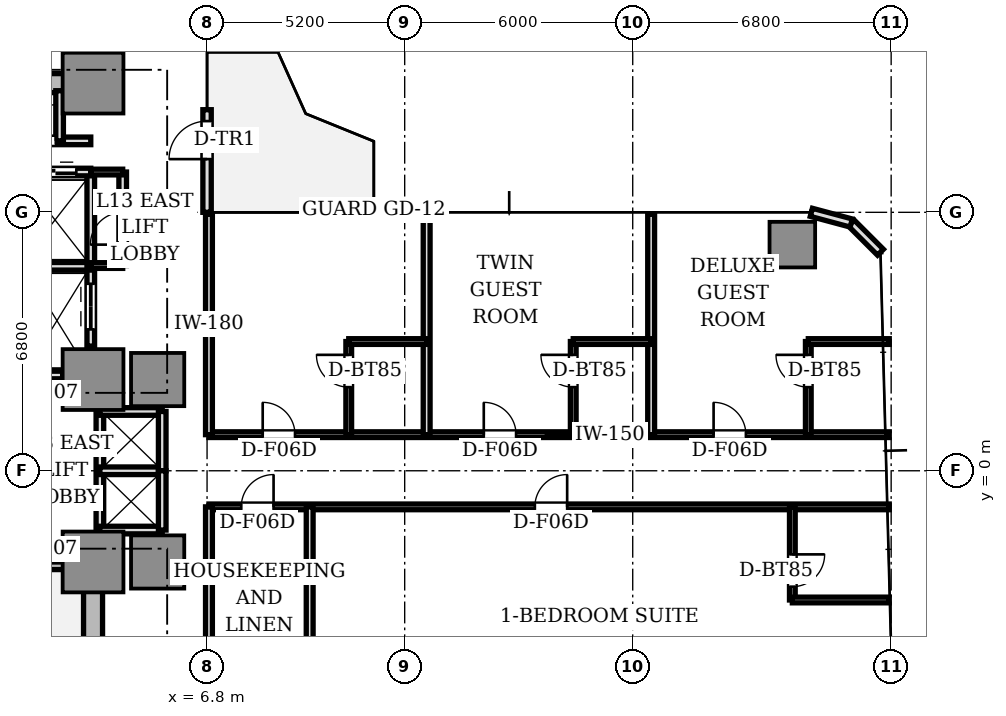
"""IFC4 building model, lengths in metres.
Left out: names, types, materials, properties, quantities, classifications, styles, units other than length and angle.
Written with IfcOpenShell. Run it as: python <this file> out.ifc"""

import sys

from ifc_helpers import new_model, si_unit, direction, frame, frame_2d, origin, origin_2d, place, context, subcontext, project, spatial, rectangle, extrude, source, transform, mapped, element, fill, save


model = new_model("IFC4")
c1 = context("Model", 3, precision=1e-05, world=origin(), true_north=direction((0.0, 1.0)))
c2 = subcontext(c1, "Body", "Model", "MODEL_VIEW")
j1 = project(units=[si_unit("LENGTHUNIT", "METRE"), si_unit("PLANEANGLEUNIT", "RADIAN")], contexts=[c1])
p1 = place(None, origin())
s1 = spatial("IfcSite", under=j1, at=p1, CompositionType="ELEMENT")
p2 = place(p1, origin())
s2 = spatial("IfcBuilding", under=s1, at=p2, CompositionType="ELEMENT")
p3 = place(p2, frame((0.0, 0.0, 51.05)))
s3 = spatial("IfcBuildingStorey", under=s2, at=p3, CompositionType="ELEMENT", Elevation=51.05)
p4 = place(p3, frame((-3.55, 10.2, 0.0), z_axis=(0.0, 0.0, 1.0), x_axis=(1.0, 0.0, 0.0)))
e1 = element("IfcWall", 1, at=p4, inside=s3, PredefinedType="SHEAR", context=c2, shape_type="SweptSolid", body=[
    extrude(rectangle(XDim=7.1, YDim=0.5, at=frame_2d((3.55, 0.0))), origin(), (0.0, 0.0, 1.0), 3.11),
])
p5 = place(p3, frame((3.8, -9.75, 0.0), z_axis=(0.0, 0.0, 1.0), x_axis=(0.0, 1.0, 0.0)))
e2 = element("IfcWall", 2, at=p5, inside=s3, PredefinedType="SHEAR", context=c2, shape_type="SweptSolid", body=[
    extrude(rectangle(XDim=6.9, YDim=0.5, at=frame_2d((3.45, 0.0))), origin(), (0.0, 0.0, 1.0), 3.11),
])
m1 = source(origin(), c2, "Body", "SweptSolid", [
    extrude(rectangle(XDim=1.6, YDim=1.6, at=origin_2d()), origin(), (0.0, 0.0, 1.0), 3.11),
])
for number, where, z_axis, x_axis in (
    (3, (3.8, 2.4, 0.0), (0.0, 0.0, 1.0), (1.0, 0.0, 0.0)),
    (4, (3.8, 10.2, 0.0), (0.0, 0.0, 1.0), (1.0, 0.0, 0.0)),
    (5, (3.8, -2.4, 0.0), (0.0, 0.0, 1.0), (1.0, 0.0, 0.0)),
):
    element("IfcColumn", number, at=place(p3, frame(where, z_axis=z_axis, x_axis=x_axis)), inside=s3, PredefinedType="COLUMN", context=c2, shape_type="MappedRepresentation", body=[
        mapped(m1, transform((0.0, 0.0, 0.0), scale=1.0)),
    ])
m2 = source(origin(), c2, "Body", "SweptSolid", [
    extrude(rectangle(XDim=1.4, YDim=1.4, at=origin_2d()), origin(), (0.0, 0.0, 1.0), 3.11),
])
for number, where, z_axis, x_axis in (
    (6, (5.5, 2.4, 0.0), (0.0, 0.0, 1.0), (1.0, 0.0, 0.0)),
    (7, (5.5, -2.4, 0.0), (0.0, 0.0, 1.0), (1.0, 0.0, 0.0)),
):
    element("IfcColumn", number, at=place(p3, frame(where, z_axis=z_axis, x_axis=x_axis)), inside=s3, PredefinedType="COLUMN", context=c2, shape_type="MappedRepresentation", body=[
        mapped(m2, transform((0.0, 0.0, 0.0), scale=1.0)),
    ])
m3 = source(origin(), c2, "Body", "SweptSolid", [
    extrude(rectangle(XDim=1.2, YDim=1.2, at=origin_2d()), origin(), (0.0, 0.0, 1.0), 3.11),
])
p6 = place(p3, frame((22.2, 5.95, 0.0), z_axis=(0.0, 0.0, 1.0), x_axis=(1.0, 0.0, 0.0)))
e8 = element("IfcColumn", 8, at=p6, inside=s3, PredefinedType="COLUMN", context=c2, shape_type="MappedRepresentation", body=[
    mapped(m3, transform((0.0, 0.0, 0.0), scale=1.0)),
])
for number, where, z_axis, x_axis in (
    (9, (24.519, 5.75, 0.0), (0.0, 0.0, 1.0), (-0.707, 0.707, 0.0)),
    (10, (23.75, 6.519, 0.0), (0.0, 0.0, 1.0), (-0.966, 0.259, 0.0)),
):
    element("IfcWall", number, at=place(p3, frame(where, z_axis=z_axis, x_axis=x_axis)), inside=s3, PredefinedType="STANDARD", context=c2, shape_type="SweptSolid", body=[
        extrude(rectangle(XDim=1.087, YDim=0.22, at=frame_2d((0.543, 0.0))), origin(), (0.0, 0.0, 1.0), 3.11),
    ])
p7 = place(p3, frame((6.8, 6.8, 0.0), z_axis=(0.0, 0.0, 1.0), x_axis=(0.0, 1.0, 0.0)))
e11 = element("IfcWall", 11, at=p7, inside=s3, PredefinedType="STANDARD", context=c2, shape_type="SweptSolid", body=[
    extrude(rectangle(XDim=2.7, YDim=0.22, at=frame_2d((1.35, 0.0))), origin(), (0.0, 0.0, 1.0), 3.11),
])
p8 = place(p7, frame((1.4, 0.0, 0.0)))
e12 = element("IfcOpeningElement", 12, at=p8, cuts=e11, PredefinedType="OPENING", context=c2, shape_type="SweptSolid", body=[
    extrude(rectangle(XDim=1.0, YDim=2.2, at=frame_2d((0.5, 1.1))), frame((0.0, 0.12, 0.0), z_axis=(0.0, -1.0, 0.0), x_axis=(1.0, 0.0, 0.0)), (0.0, 0.0, 1.0), 0.24),
])
p9 = place(p3, frame((0.0, -2.5, 0.0), z_axis=(0.0, 0.0, 1.0), x_axis=(1.0, 0.0, 0.0)))
e13 = element("IfcWall", 13, at=p9, inside=s3, PredefinedType="SOLIDWALL", context=c2, shape_type="SweptSolid", body=[
    extrude(rectangle(XDim=3.72, YDim=0.2, at=frame_2d((1.86, 0.0))), origin(), (0.0, 0.0, 1.0), 3.11),
])
p10 = place(p3, frame((2.0, 2.52, 0.0), z_axis=(0.0, 0.0, 1.0), x_axis=(1.0, 0.0, 0.0)))
e14 = element("IfcWall", 14, at=p10, inside=s3, PredefinedType="SOLIDWALL", context=c2, shape_type="SweptSolid", body=[
    extrude(rectangle(XDim=1.0, YDim=0.2, at=frame_2d((0.5, 0.0))), origin(), (0.0, 0.0, 1.0), 2.66),
])
p11 = place(p3, frame((3.74, 3.28, 0.0), z_axis=(0.0, 0.0, 1.0), x_axis=(0.0, 1.0, 0.0)))
e15 = element("IfcWall", 15, at=p11, inside=s3, PredefinedType="SOLIDWALL", context=c2, shape_type="SweptSolid", body=[
    extrude(rectangle(XDim=2.08, YDim=0.2, at=frame_2d((1.04, 0.0))), origin(), (0.0, 0.0, 1.0), 2.66),
])
p12 = place(p11, frame((0.44, 0.0, 0.0)))
e16 = element("IfcOpeningElement", 16, at=p12, cuts=e15, PredefinedType="OPENING", context=c2, shape_type="SweptSolid", body=[
    extrude(rectangle(XDim=1.2, YDim=2.2, at=frame_2d((0.6, 1.1))), frame((0.0, 0.11, 0.0), z_axis=(0.0, -1.0, 0.0), x_axis=(1.0, 0.0, 0.0)), (0.0, 0.0, 1.0), 0.22),
])
p13 = place(p3, frame((0.05, 5.38, 0.0), z_axis=(0.0, 0.0, 1.0), x_axis=(1.0, 0.0, 0.0)))
e17 = element("IfcWall", 17, at=p13, inside=s3, PredefinedType="SOLIDWALL", context=c2, shape_type="SweptSolid", body=[
    extrude(rectangle(XDim=3.69, YDim=0.2, at=frame_2d((1.845, 0.0))), origin(), (0.0, 0.0, 1.0), 2.66),
])
p14 = place(p3, frame((3.74, 5.38, 0.0), z_axis=(0.0, 0.0, 1.0), x_axis=(0.0, 1.0, 0.0)))
e18 = element("IfcWall", 18, at=p14, inside=s3, PredefinedType="SOLIDWALL", context=c2, shape_type="SweptSolid", body=[
    extrude(rectangle(XDim=2.48, YDim=0.2, at=frame_2d((1.24, 0.0))), origin(), (0.0, 0.0, 1.0), 2.66),
])
p15 = place(p3, frame((1.9, 7.86, 0.0), z_axis=(0.0, 0.0, 1.0), x_axis=(1.0, 0.0, 0.0)))
e19 = element("IfcWall", 19, at=p15, inside=s3, PredefinedType="SOLIDWALL", context=c2, shape_type="SweptSolid", body=[
    extrude(rectangle(XDim=1.84, YDim=0.2, at=frame_2d((0.92, 0.0))), origin(), (0.0, 0.0, 1.0), 2.66),
])
p16 = place(p15, frame((0.36, 0.0, 0.0)))
e20 = element("IfcOpeningElement", 20, at=p16, cuts=e19, PredefinedType="OPENING", context=c2, shape_type="SweptSolid", body=[
    extrude(rectangle(XDim=1.1, YDim=2.2, at=frame_2d((0.55, 1.1))), frame((0.0, 0.11, 0.0), z_axis=(0.0, -1.0, 0.0), x_axis=(1.0, 0.0, 0.0)), (0.0, 0.0, 1.0), 0.22),
])
p17 = place(p3, frame((3.98, -1.56, 0.0), z_axis=(0.0, 0.0, 1.0), x_axis=(0.0, 1.0, 0.0)))
e21 = element("IfcWall", 21, at=p17, inside=s3, PredefinedType="SOLIDWALL", context=c2, shape_type="SweptSolid", body=[
    extrude(rectangle(XDim=3.12, YDim=0.2, at=frame_2d((1.56, 0.0))), origin(), (0.0, 0.0, 1.0), 2.18),
])
for number, where, z_axis, x_axis in (
    (22, (3.98, 1.56, 0.0), (0.0, 0.0, 1.0), (1.0, 0.0, 0.0)),
    (23, (3.98, -1.56, 0.0), (0.0, 0.0, 1.0), (1.0, 0.0, 0.0)),
    (24, (3.98, 0.0, 0.0), (0.0, 0.0, 1.0), (1.0, 0.0, 0.0)),
):
    element("IfcWall", number, at=place(p3, frame(where, z_axis=z_axis, x_axis=x_axis)), inside=s3, PredefinedType="SOLIDWALL", context=c2, shape_type="SweptSolid", body=[
        extrude(rectangle(XDim=1.64, YDim=0.2, at=frame_2d((0.82, 0.0))), origin(), (0.0, 0.0, 1.0), 2.66),
    ])
for number, where, z_axis, x_axis in (
    (25, (5.62, 0.0, 0.0), (0.0, 0.0, 1.0), (0.0, 1.0, 0.0)),
    (26, (5.62, -1.56, 0.0), (0.0, 0.0, 1.0), (0.0, 1.0, 0.0)),
):
    element("IfcWall", number, at=place(p3, frame(where, z_axis=z_axis, x_axis=x_axis)), inside=s3, PredefinedType="SOLIDWALL", context=c2, shape_type="SweptSolid", body=[
        extrude(rectangle(XDim=1.56, YDim=0.2, at=frame_2d((0.78, 0.0))), origin(), (0.0, 0.0, 1.0), 2.66),
    ])
p18 = place(p3, frame((0.12, 8.68, 0.0), z_axis=(0.0, 0.0, 1.0), x_axis=(1.0, 0.0, 0.0)))
e27 = element("IfcWall", 27, at=p18, inside=s3, PredefinedType="SOLIDWALL", context=c2, shape_type="SweptSolid", body=[
    extrude(rectangle(XDim=3.62, YDim=0.2, at=frame_2d((1.81, 0.0))), origin(), (0.0, 0.0, 1.0), 2.66),
])
p19 = place(p18, frame((1.75, 0.0, 0.0)))
e28 = element("IfcOpeningElement", 28, at=p19, cuts=e27, PredefinedType="OPENING", context=c2, shape_type="SweptSolid", body=[
    extrude(rectangle(XDim=0.95, YDim=2.15, at=frame_2d((0.475, 1.075))), frame((0.0, 0.11, 0.0), z_axis=(0.0, -1.0, 0.0), x_axis=(1.0, 0.0, 0.0)), (0.0, 0.0, 1.0), 0.22),
])
p20 = place(p3, frame((2.92, 8.68, 0.0), z_axis=(0.0, 0.0, 1.0), x_axis=(0.0, 1.0, 0.0)))
e29 = element("IfcWall", 29, at=p20, inside=s3, PredefinedType="SOLIDWALL", context=c2, shape_type="SweptSolid", body=[
    extrude(rectangle(XDim=1.32, YDim=0.2, at=frame_2d((0.66, 0.0))), origin(), (0.0, 0.0, 1.0), 2.66),
])
p21 = place(p3, frame((4.58, 5.4, 0.0), z_axis=(0.0, 0.0, 1.0), x_axis=(0.0, 1.0, 0.0)))
e30 = element("IfcWall", 30, at=p21, inside=s3, PredefinedType="SOLIDWALL", context=c2, shape_type="SweptSolid", body=[
    extrude(rectangle(XDim=2.46, YDim=0.2, at=frame_2d((1.23, 0.0))), origin(), (0.0, 0.0, 1.0), 2.66),
])
p22 = place(p21, frame((0.55, 0.0, 0.0)))
e31 = element("IfcOpeningElement", 31, at=p22, cuts=e30, PredefinedType="OPENING", context=c2, shape_type="SweptSolid", body=[
    extrude(rectangle(XDim=0.85, YDim=2.1, at=frame_2d((0.425, 1.05))), frame((0.0, 0.11, 0.0), z_axis=(0.0, -1.0, 0.0), x_axis=(1.0, 0.0, 0.0)), (0.0, 0.0, 1.0), 0.22),
])
for number, where, z_axis, x_axis in (
    (32, (3.74, 5.4, 0.0), (0.0, 0.0, 1.0), (1.0, 0.0, 0.0)),
    (33, (3.74, 7.86, 0.0), (0.0, 0.0, 1.0), (1.0, 0.0, 0.0)),
):
    element("IfcWall", number, at=place(p3, frame(where, z_axis=z_axis, x_axis=x_axis)), inside=s3, PredefinedType="PARTITIONING", context=c2, shape_type="SweptSolid", body=[
        extrude(rectangle(XDim=0.84, YDim=0.15, at=frame_2d((0.42, 0.0))), origin(), (0.0, 0.0, 1.0), 2.66),
    ])
p23 = place(p3, frame((6.85, 0.95, 0.0), z_axis=(0.0, 0.0, 1.0), x_axis=(1.0, 0.0, 0.0)))
e34 = element("IfcWall", 34, at=p23, inside=s3, PredefinedType="PARTITIONING", context=c2, shape_type="SweptSolid", body=[
    extrude(rectangle(XDim=17.9, YDim=0.15, at=frame_2d((8.95, 0.0))), origin(), (0.0, 0.0, 1.0), 2.66),
])
p24 = place(p23, frame((1.414, 0.0, 0.0)))
e35 = element("IfcOpeningElement", 35, at=p24, cuts=e34, PredefinedType="OPENING", context=c2, shape_type="SweptSolid", body=[
    extrude(rectangle(XDim=0.85, YDim=2.1, at=frame_2d((0.425, 1.05))), frame((0.0, 0.085, 0.0), z_axis=(0.0, -1.0, 0.0), x_axis=(1.0, 0.0, 0.0)), (0.0, 0.0, 1.0), 0.17),
])
p25 = place(p23, frame((7.231, 0.0, 0.0)))
e36 = element("IfcOpeningElement", 36, at=p25, cuts=e34, PredefinedType="OPENING", context=c2, shape_type="SweptSolid", body=[
    extrude(rectangle(XDim=0.85, YDim=2.1, at=frame_2d((0.425, 1.05))), frame((0.0, 0.085, 0.0), z_axis=(0.0, -1.0, 0.0), x_axis=(1.0, 0.0, 0.0)), (0.0, 0.0, 1.0), 0.17),
])
p26 = place(p23, frame((13.278, 0.0, 0.0)))
e37 = element("IfcOpeningElement", 37, at=p26, cuts=e34, PredefinedType="OPENING", context=c2, shape_type="SweptSolid", body=[
    extrude(rectangle(XDim=0.85, YDim=2.1, at=frame_2d((0.425, 1.05))), frame((0.0, 0.085, 0.0), z_axis=(0.0, -1.0, 0.0), x_axis=(1.0, 0.0, 0.0)), (0.0, 0.0, 1.0), 0.17),
])
p27 = place(p3, frame((6.85, -0.95, 0.0), z_axis=(0.0, 0.0, 1.0), x_axis=(1.0, 0.0, 0.0)))
e38 = element("IfcWall", 38, at=p27, inside=s3, PredefinedType="PARTITIONING", context=c2, shape_type="SweptSolid", body=[
    extrude(rectangle(XDim=17.9, YDim=0.15, at=frame_2d((8.95, 0.0))), origin(), (0.0, 0.0, 1.0), 2.66),
])
p28 = place(p27, frame((0.85, 0.0, 0.0)))
e39 = element("IfcOpeningElement", 39, at=p28, cuts=e38, PredefinedType="OPENING", context=c2, shape_type="SweptSolid", body=[
    extrude(rectangle(XDim=0.85, YDim=2.1, at=frame_2d((0.425, 1.05))), frame((0.0, 0.085, 0.0), z_axis=(0.0, -1.0, 0.0), x_axis=(1.0, 0.0, 0.0)), (0.0, 0.0, 1.0), 0.17),
])
p29 = place(p27, frame((8.575, 0.0, 0.0)))
e40 = element("IfcOpeningElement", 40, at=p29, cuts=e38, PredefinedType="OPENING", context=c2, shape_type="SweptSolid", body=[
    extrude(rectangle(XDim=0.85, YDim=2.1, at=frame_2d((0.425, 1.05))), frame((0.0, 0.085, 0.0), z_axis=(0.0, -1.0, 0.0), x_axis=(1.0, 0.0, 0.0)), (0.0, 0.0, 1.0), 0.17),
])
for number, where, z_axis, x_axis in (
    (41, (6.85, 0.95, 0.0), (0.0, 0.0, 1.0), (0.0, 1.0, 0.0)),
    (42, (6.85, -6.75, 0.0), (0.0, 0.0, 1.0), (0.0, 1.0, 0.0)),
    (43, (12.578, 0.95, 0.0), (0.0, 0.0, 1.0), (0.0, 1.0, 0.0)),
):
    element("IfcWall", number, at=place(p3, frame(where, z_axis=z_axis, x_axis=x_axis)), inside=s3, PredefinedType="PARTITIONING", context=c2, shape_type="SweptSolid", body=[
        extrude(rectangle(XDim=5.8, YDim=0.18, at=frame_2d((2.9, 0.0))), origin(), (0.0, 0.0, 1.0), 2.66),
    ])
p30 = place(p3, frame((10.528, 0.95, 0.0), z_axis=(0.0, 0.0, 1.0), x_axis=(0.0, 1.0, 0.0)))
e44 = element("IfcWall", 44, at=p30, inside=s3, PredefinedType="PARTITIONING", context=c2, shape_type="SweptSolid", body=[
    extrude(rectangle(XDim=2.45, YDim=0.15, at=frame_2d((1.225, 0.0))), origin(), (0.0, 0.0, 1.0), 2.66),
])
p31 = place(p30, frame((1.25, 0.0, 0.0)))
e45 = element("IfcOpeningElement", 45, at=p31, cuts=e44, PredefinedType="OPENING", context=c2, shape_type="SweptSolid", body=[
    extrude(rectangle(XDim=0.85, YDim=2.1, at=frame_2d((0.425, 1.05))), frame((0.0, 0.085, 0.0), z_axis=(0.0, -1.0, 0.0), x_axis=(1.0, 0.0, 0.0)), (0.0, 0.0, 1.0), 0.17),
])
p32 = place(p3, frame((10.528, 3.4, 0.0), z_axis=(0.0, 0.0, 1.0), x_axis=(1.0, 0.0, 0.0)))
e46 = element("IfcWall", 46, at=p32, inside=s3, PredefinedType="PARTITIONING", context=c2, shape_type="SweptSolid", body=[
    extrude(rectangle(XDim=2.05, YDim=0.15, at=frame_2d((1.025, 0.0))), origin(), (0.0, 0.0, 1.0), 2.63),
])
p33 = place(p3, frame((18.485, 0.95, 0.0), z_axis=(0.0, 0.0, 1.0), x_axis=(0.0, 1.0, 0.0)))
e47 = element("IfcWall", 47, at=p33, inside=s3, PredefinedType="PARTITIONING", context=c2, shape_type="SweptSolid", body=[
    extrude(rectangle(XDim=5.8, YDim=0.18, at=frame_2d((2.9, 0.0))), origin(), (0.0, 0.0, 1.0), 2.66),
])
p34 = place(p3, frame((16.435, 0.95, 0.0), z_axis=(0.0, 0.0, 1.0), x_axis=(0.0, 1.0, 0.0)))
e48 = element("IfcWall", 48, at=p34, inside=s3, PredefinedType="PARTITIONING", context=c2, shape_type="SweptSolid", body=[
    extrude(rectangle(XDim=2.45, YDim=0.15, at=frame_2d((1.225, 0.0))), origin(), (0.0, 0.0, 1.0), 2.66),
])
p35 = place(p34, frame((1.25, 0.0, 0.0)))
e49 = element("IfcOpeningElement", 49, at=p35, cuts=e48, PredefinedType="OPENING", context=c2, shape_type="SweptSolid", body=[
    extrude(rectangle(XDim=0.85, YDim=2.1, at=frame_2d((0.425, 1.05))), frame((0.0, 0.085, 0.0), z_axis=(0.0, -1.0, 0.0), x_axis=(1.0, 0.0, 0.0)), (0.0, 0.0, 1.0), 0.17),
])
p36 = place(p3, frame((16.435, 3.4, 0.0), z_axis=(0.0, 0.0, 1.0), x_axis=(1.0, 0.0, 0.0)))
e50 = element("IfcWall", 50, at=p36, inside=s3, PredefinedType="PARTITIONING", context=c2, shape_type="SweptSolid", body=[
    extrude(rectangle(XDim=2.05, YDim=0.15, at=frame_2d((1.025, 0.0))), origin(), (0.0, 0.0, 1.0), 2.63),
])
p37 = place(p3, frame((22.62, 0.95, 0.0), z_axis=(0.0, 0.0, 1.0), x_axis=(0.0, 1.0, 0.0)))
e51 = element("IfcWall", 51, at=p37, inside=s3, PredefinedType="PARTITIONING", context=c2, shape_type="SweptSolid", body=[
    extrude(rectangle(XDim=2.45, YDim=0.15, at=frame_2d((1.225, 0.0))), origin(), (0.0, 0.0, 1.0), 2.66),
])
p38 = place(p37, frame((1.25, 0.0, 0.0)))
e52 = element("IfcOpeningElement", 52, at=p38, cuts=e51, PredefinedType="OPENING", context=c2, shape_type="SweptSolid", body=[
    extrude(rectangle(XDim=0.85, YDim=2.1, at=frame_2d((0.425, 1.05))), frame((0.0, 0.085, 0.0), z_axis=(0.0, -1.0, 0.0), x_axis=(1.0, 0.0, 0.0)), (0.0, 0.0, 1.0), 0.17),
])
p39 = place(p3, frame((22.62, 3.4, 0.0), z_axis=(0.0, 0.0, 1.0), x_axis=(1.0, 0.0, 0.0)))
e53 = element("IfcWall", 53, at=p39, inside=s3, PredefinedType="PARTITIONING", context=c2, shape_type="SweptSolid", body=[
    extrude(rectangle(XDim=2.13, YDim=0.15, at=frame_2d((1.065, 0.0))), origin(), (0.0, 0.0, 1.0), 2.66),
])
p40 = place(p3, frame((9.5, -0.95, 0.0), z_axis=(0.0, 0.0, 1.0), x_axis=(0.0, -1.0, 0.0)))
e54 = element("IfcWall", 54, at=p40, inside=s3, PredefinedType="PARTITIONING", context=c2, shape_type="SweptSolid", body=[
    extrude(rectangle(XDim=5.8, YDim=0.18, at=frame_2d((2.9, 0.0))), origin(), (0.0, 0.0, 1.0), 2.66),
])
p41 = place(p3, frame((22.2, -0.95, 0.0), z_axis=(0.0, 0.0, 1.0), x_axis=(0.0, -1.0, 0.0)))
e55 = element("IfcWall", 55, at=p41, inside=s3, PredefinedType="PARTITIONING", context=c2, shape_type="SweptSolid", body=[
    extrude(rectangle(XDim=2.45, YDim=0.15, at=frame_2d((1.225, 0.0))), origin(), (0.0, 0.0, 1.0), 2.58),
])
p42 = place(p41, frame((1.25, 0.0, 0.0)))
e56 = element("IfcOpeningElement", 56, at=p42, cuts=e55, PredefinedType="OPENING", context=c2, shape_type="SweptSolid", body=[
    extrude(rectangle(XDim=0.85, YDim=2.1, at=frame_2d((0.425, 1.05))), frame((0.0, 0.085, 0.0), z_axis=(0.0, -1.0, 0.0), x_axis=(1.0, 0.0, 0.0)), (0.0, 0.0, 1.0), 0.17),
])
p43 = place(p3, frame((22.2, -3.4, 0.0), z_axis=(0.0, 0.0, 1.0), x_axis=(1.0, 0.0, 0.0)))
e57 = element("IfcWall", 57, at=p43, inside=s3, PredefinedType="PARTITIONING", context=c2, shape_type="SweptSolid", body=[
    extrude(rectangle(XDim=2.55, YDim=0.15, at=frame_2d((1.275, 0.0))), origin(), (0.0, 0.0, 1.0), 2.66),
])
m4 = source(origin(), c2, "Body", "SweptSolid", [
    extrude(rectangle(XDim=1.0, YDim=0.05, at=origin_2d()), origin(), (0.0, 0.0, 1.0), 2.2),
])
p44 = place(p8, frame((0.5, 0.0, 0.0)))
e58 = element("IfcDoor", 58, at=p44, inside=s3, OperationType="SINGLE_SWING_LEFT", PredefinedType="DOOR", context=c2, shape_type="MappedRepresentation", body=[
    mapped(m4, transform((0.0, 0.0, 0.0), scale=1.0)),
])
fill(e12, e58)
m5 = source(origin(), c2, "Body", "SweptSolid", [
    extrude(rectangle(XDim=1.2, YDim=0.05, at=origin_2d()), origin(), (0.0, 0.0, 1.0), 2.2),
])
p45 = place(p12, frame((0.6, 0.0, 0.0)))
e59 = element("IfcDoor", 59, at=p45, inside=s3, OperationType="DOUBLE_DOOR_SLIDING", PredefinedType="DOOR", context=c2, shape_type="MappedRepresentation", body=[
    mapped(m5, transform((0.0, 0.0, 0.0), scale=1.0)),
])
fill(e16, e59)
m6 = source(origin(), c2, "Body", "SweptSolid", [
    extrude(rectangle(XDim=1.1, YDim=0.05, at=origin_2d()), origin(), (0.0, 0.0, 1.0), 2.2),
])
p46 = place(p16, frame((0.55, 0.0, 0.0)))
e60 = element("IfcDoor", 60, at=p46, inside=s3, OperationType="DOUBLE_DOOR_SLIDING", PredefinedType="DOOR", context=c2, shape_type="MappedRepresentation", body=[
    mapped(m6, transform((0.0, 0.0, 0.0), scale=1.0)),
])
fill(e20, e60)
m7 = source(origin(), c2, "Body", "SweptSolid", [
    extrude(rectangle(XDim=0.95, YDim=0.05, at=origin_2d()), origin(), (0.0, 0.0, 1.0), 2.15),
])
p47 = place(p19, frame((0.475, 0.0, 0.0)))
e61 = element("IfcDoor", 61, at=p47, inside=s3, OperationType="SINGLE_SWING_RIGHT", PredefinedType="DOOR", context=c2, shape_type="MappedRepresentation", body=[
    mapped(m7, transform((0.0, 0.0, 0.0), scale=1.0)),
])
fill(e28, e61)
m8 = source(origin(), c2, "Body", "SweptSolid", [
    extrude(rectangle(XDim=0.85, YDim=0.05, at=origin_2d()), origin(), (0.0, 0.0, 1.0), 2.1),
])
p48 = place(p22, frame((0.425, 0.0, 0.0)))
e62 = element("IfcDoor", 62, at=p48, inside=s3, OperationType="SINGLE_SWING_LEFT", PredefinedType="DOOR", context=c2, shape_type="MappedRepresentation", body=[
    mapped(m8, transform((0.0, 0.0, 0.0), scale=1.0)),
])
fill(e31, e62)
p49 = place(p31, frame((0.425, 0.0, 0.0)))
e63 = element("IfcDoor", 63, at=p49, inside=s3, OperationType="SINGLE_SWING_RIGHT", PredefinedType="DOOR", context=c2, shape_type="MappedRepresentation", body=[
    mapped(m8, transform((0.0, 0.0, 0.0), scale=1.0)),
])
fill(e45, e63)
p50 = place(p24, frame((0.425, 0.0, 0.0)))
e64 = element("IfcDoor", 64, at=p50, inside=s3, OperationType="SINGLE_SWING_LEFT", PredefinedType="DOOR", context=c2, shape_type="MappedRepresentation", body=[
    mapped(m8, transform((0.0, 0.0, 0.0), scale=1.0)),
])
fill(e35, e64)
p51 = place(p35, frame((0.425, 0.0, 0.0)))
e65 = element("IfcDoor", 65, at=p51, inside=s3, OperationType="SINGLE_SWING_RIGHT", PredefinedType="DOOR", context=c2, shape_type="MappedRepresentation", body=[
    mapped(m8, transform((0.0, 0.0, 0.0), scale=1.0)),
])
fill(e49, e65)
p52 = place(p25, frame((0.425, 0.0, 0.0)))
e66 = element("IfcDoor", 66, at=p52, inside=s3, OperationType="SINGLE_SWING_LEFT", PredefinedType="DOOR", context=c2, shape_type="MappedRepresentation", body=[
    mapped(m8, transform((0.0, 0.0, 0.0), scale=1.0)),
])
fill(e36, e66)
p53 = place(p38, frame((0.425, 0.0, 0.0)))
e67 = element("IfcDoor", 67, at=p53, inside=s3, OperationType="SINGLE_SWING_RIGHT", PredefinedType="DOOR", context=c2, shape_type="MappedRepresentation", body=[
    mapped(m8, transform((0.0, 0.0, 0.0), scale=1.0)),
])
fill(e52, e67)
p54 = place(p26, frame((0.425, 0.0, 0.0)))
e68 = element("IfcDoor", 68, at=p54, inside=s3, OperationType="SINGLE_SWING_LEFT", PredefinedType="DOOR", context=c2, shape_type="MappedRepresentation", body=[
    mapped(m8, transform((0.0, 0.0, 0.0), scale=1.0)),
])
fill(e37, e68)
p55 = place(p28, frame((0.425, 0.0, 0.0)))
e69 = element("IfcDoor", 69, at=p55, inside=s3, OperationType="SINGLE_SWING_RIGHT", PredefinedType="DOOR", context=c2, shape_type="MappedRepresentation", body=[
    mapped(m8, transform((0.0, 0.0, 0.0), scale=1.0)),
])
fill(e39, e69)
p56 = place(p42, frame((0.425, 0.0, 0.0)))
e70 = element("IfcDoor", 70, at=p56, inside=s3, OperationType="SINGLE_SWING_LEFT", PredefinedType="DOOR", context=c2, shape_type="MappedRepresentation", body=[
    mapped(m8, transform((0.0, 0.0, 0.0), scale=1.0)),
])
fill(e56, e70)
p57 = place(p29, frame((0.425, 0.0, 0.0)))
e71 = element("IfcDoor", 71, at=p57, inside=s3, OperationType="SINGLE_SWING_RIGHT", PredefinedType="DOOR", context=c2, shape_type="MappedRepresentation", body=[
    mapped(m8, transform((0.0, 0.0, 0.0), scale=1.0)),
])
fill(e40, e71)
save(model, sys.argv[1])
